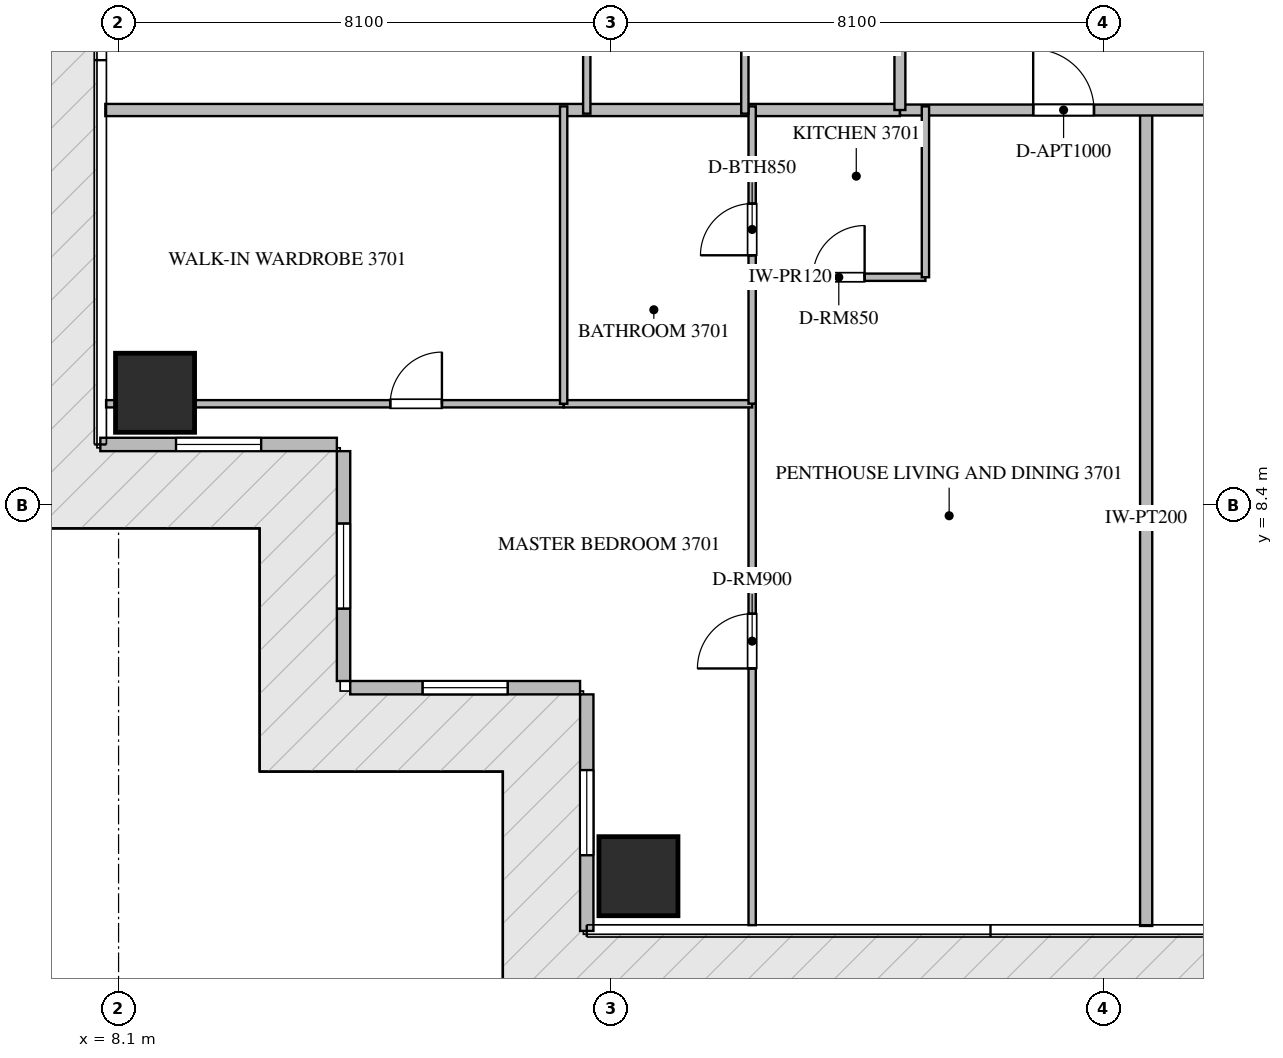
"""IFC4 building model, lengths in metres.
Left out: names, types, materials, properties, quantities, classifications, styles, units other than length and angle.
Written with IfcOpenShell. Run it as: python <this file> out.ifc"""

import sys

from ifc_helpers import new_model, si_unit, direction, frame, frame_2d, origin, origin_2d, place, context, subcontext, project, spatial, rectangle, extrude, source, transform, mapped, element, fill, save


model = new_model("IFC4")
c1 = context("Model", 3, precision=1e-05, world=origin(), true_north=direction((0.0, 1.0)))
c2 = subcontext(c1, "Body", "Model", "MODEL_VIEW")
j1 = project(units=[si_unit("LENGTHUNIT", "METRE"), si_unit("PLANEANGLEUNIT", "RADIAN")], contexts=[c1])
p1 = place(None, origin())
s1 = spatial("IfcSite", under=j1, at=p1, CompositionType="ELEMENT")
p2 = place(p1, origin())
s2 = spatial("IfcBuilding", under=s1, at=p2, CompositionType="ELEMENT")
p3 = place(p2, frame((0.0, 0.0, 150.15)))
s3 = spatial("IfcBuildingStorey", under=s2, at=p3, CompositionType="ELEMENT", Elevation=150.15)
m1 = source(origin(), c2, "Body", "SweptSolid", [
    extrude(rectangle(XDim=1.3, YDim=1.3, at=origin_2d()), origin(), (0.0, 0.0, 1.0), 3.75),
])
for number, where, z_axis, x_axis in (
    (1, (16.65, 2.3, -0.26), (0.0, 0.0, 1.0), (1.0, 0.0, 0.0)),
    (2, (8.7, 10.25, -0.26), (0.0, 0.0, 1.0), (1.0, 0.0, 0.0)),
):
    element("IfcColumn", number, at=place(p3, frame(where, z_axis=z_axis, x_axis=x_axis)), inside=s3, PredefinedType="COLUMN", context=c2, shape_type="MappedRepresentation", body=[
        mapped(m1, transform((0.0, 0.0, 0.0), scale=1.0)),
    ])
p4 = place(p3, frame((7.8, 9.4, 0.0), z_axis=(0.0, 0.0, 1.0), x_axis=(1.0, 0.0, 0.0)))
e3 = element("IfcWall", 3, at=p4, inside=s3, PredefinedType="ELEMENTEDWALL", context=c2, shape_type="SweptSolid", body=[
    extrude(rectangle(XDim=3.89, YDim=0.22, at=frame_2d((1.945, 0.0))), origin(), (0.0, 0.0, 1.0), 3.475),
])
p5 = place(p4, frame((1.245, 0.0, 0.65)))
e4 = element("IfcOpeningElement", 4, at=p5, cuts=e3, PredefinedType="OPENING", context=c2, shape_type="SweptSolid", body=[
    extrude(rectangle(XDim=1.4, YDim=2.05, at=frame_2d((0.7, 1.025))), frame((0.0, 0.12, 0.0), z_axis=(0.0, -1.0, 0.0), x_axis=(1.0, 0.0, 0.0)), (0.0, 0.0, 1.0), 0.24),
])
p6 = place(p3, frame((11.8, 9.29, 0.0), z_axis=(0.0, 0.0, 1.0), x_axis=(0.0, -1.0, 0.0)))
e5 = element("IfcWall", 5, at=p6, inside=s3, PredefinedType="ELEMENTEDWALL", context=c2, shape_type="SweptSolid", body=[
    extrude(rectangle(XDim=3.78, YDim=0.22, at=frame_2d((1.89, 0.0))), origin(), (0.0, 0.0, 1.0), 3.475),
])
p7 = place(p6, frame((1.19, 0.0, 0.65)))
e6 = element("IfcOpeningElement", 6, at=p7, cuts=e5, PredefinedType="OPENING", context=c2, shape_type="SweptSolid", body=[
    extrude(rectangle(XDim=1.4, YDim=2.05, at=frame_2d((0.7, 1.025))), frame((0.0, 0.12, 0.0), z_axis=(0.0, -1.0, 0.0), x_axis=(1.0, 0.0, 0.0)), (0.0, 0.0, 1.0), 0.24),
])
p8 = place(p3, frame((11.91, 5.4, 0.0), z_axis=(0.0, 0.0, 1.0), x_axis=(1.0, 0.0, 0.0)))
e7 = element("IfcWall", 7, at=p8, inside=s3, PredefinedType="ELEMENTEDWALL", context=c2, shape_type="SweptSolid", body=[
    extrude(rectangle(XDim=3.78, YDim=0.22, at=frame_2d((1.89, 0.0))), origin(), (0.0, 0.0, 1.0), 3.475),
])
p9 = place(p8, frame((1.19, 0.0, 0.65)))
e8 = element("IfcOpeningElement", 8, at=p9, cuts=e7, PredefinedType="OPENING", context=c2, shape_type="SweptSolid", body=[
    extrude(rectangle(XDim=1.4, YDim=2.05, at=frame_2d((0.7, 1.025))), frame((0.0, 0.12, 0.0), z_axis=(0.0, -1.0, 0.0), x_axis=(1.0, 0.0, 0.0)), (0.0, 0.0, 1.0), 0.24),
])
p10 = place(p3, frame((15.8, 5.29, 0.0), z_axis=(0.0, 0.0, 1.0), x_axis=(0.0, -1.0, 0.0)))
e9 = element("IfcWall", 9, at=p10, inside=s3, PredefinedType="ELEMENTEDWALL", context=c2, shape_type="SweptSolid", body=[
    extrude(rectangle(XDim=3.89, YDim=0.22, at=frame_2d((1.945, 0.0))), origin(), (0.0, 0.0, 1.0), 3.475),
])
p11 = place(p10, frame((1.245, 0.0, 0.65)))
e10 = element("IfcOpeningElement", 10, at=p11, cuts=e9, PredefinedType="OPENING", context=c2, shape_type="SweptSolid", body=[
    extrude(rectangle(XDim=1.4, YDim=2.05, at=frame_2d((0.7, 1.025))), frame((0.0, 0.12, 0.0), z_axis=(0.0, -1.0, 0.0), x_axis=(1.0, 0.0, 0.0)), (0.0, 0.0, 1.0), 0.24),
])
p12 = place(p3, frame((25.0, 1.482, 0.0), z_axis=(0.0, 0.0, 1.0), x_axis=(0.0, 1.0, 0.0)))
e11 = element("IfcWall", 11, at=p12, inside=s3, PredefinedType="PARTITIONING", context=c2, shape_type="SweptSolid", body=[
    extrude(rectangle(XDim=13.418, YDim=0.2, at=frame_2d((6.709, 0.0))), origin(), (0.0, 0.0, 1.0), 3.49),
])
p13 = place(p3, frame((7.882, 14.9, 0.0), z_axis=(0.0, 0.0, 1.0), x_axis=(1.0, 0.0, 0.0)))
e12 = element("IfcWall", 12, at=p13, inside=s3, PredefinedType="PARTITIONING", context=c2, shape_type="SweptSolid", body=[
    extrude(rectangle(XDim=13.068, YDim=0.2, at=frame_2d((6.534, 0.0))), origin(), (0.0, 0.0, 1.0), 3.49),
])
p14 = place(p3, frame((20.952, 14.9, 0.0), z_axis=(0.0, 0.0, 1.0), x_axis=(1.0, 0.0, 0.0)))
e13 = element("IfcWall", 13, at=p14, inside=s3, PredefinedType="PARTITIONING", context=c2, shape_type="SweptSolid", body=[
    extrude(rectangle(XDim=22.896, YDim=0.18, at=frame_2d((11.448, 0.0))), origin(), (0.0, 0.0, 1.0), 3.49),
])
p15 = place(p14, frame((2.19, 0.0, 0.0)))
e14 = element("IfcOpeningElement", 14, at=p15, cuts=e13, PredefinedType="OPENING", context=c2, shape_type="SweptSolid", body=[
    extrude(rectangle(XDim=1.0, YDim=2.15, at=frame_2d((0.5, 1.075))), frame((0.0, 0.1, 0.0), z_axis=(0.0, -1.0, 0.0), x_axis=(1.0, 0.0, 0.0)), (0.0, 0.0, 1.0), 0.2),
])
p16 = place(p14, frame((5.802, 0.0, 0.0)))
e15 = element("IfcOpeningElement", 15, at=p16, cuts=e13, PredefinedType="OPENING", context=c2, shape_type="SweptSolid", body=[
    extrude(rectangle(XDim=1.0, YDim=2.15, at=frame_2d((0.5, 1.075))), frame((0.0, 0.1, 0.0), z_axis=(0.0, -1.0, 0.0), x_axis=(1.0, 0.0, 0.0)), (0.0, 0.0, 1.0), 0.2),
])
p17 = place(p14, frame((12.196, 0.0, 0.0)))
e16 = element("IfcOpeningElement", 16, at=p17, cuts=e13, PredefinedType="OPENING", context=c2, shape_type="SweptSolid", body=[
    extrude(rectangle(XDim=1.0, YDim=2.15, at=frame_2d((0.5, 1.075))), frame((0.0, 0.1, 0.0), z_axis=(0.0, -1.0, 0.0), x_axis=(1.0, 0.0, 0.0)), (0.0, 0.0, 1.0), 0.2),
])
p18 = place(p14, frame((19.706, 0.0, 0.0)))
e17 = element("IfcOpeningElement", 17, at=p18, cuts=e13, PredefinedType="OPENING", context=c2, shape_type="SweptSolid", body=[
    extrude(rectangle(XDim=1.0, YDim=2.15, at=frame_2d((0.5, 1.075))), frame((0.0, 0.1, 0.0), z_axis=(0.0, -1.0, 0.0), x_axis=(1.0, 0.0, 0.0)), (0.0, 0.0, 1.0), 0.2),
])
p19 = place(p3, frame((20.95, 14.9, 0.0), z_axis=(0.0, 0.0, 1.0), x_axis=(0.0, 1.0, 0.0)))
e18 = element("IfcWall", 18, at=p19, inside=s3, PredefinedType="PARTITIONING", context=c2, shape_type="SweptSolid", body=[
    extrude(rectangle(XDim=18.7, YDim=0.18, at=frame_2d((9.35, 0.0))), origin(), (0.0, 0.0, 1.0), 3.49),
])
p20 = place(p19, frame((5.823, 0.0, 0.0)))
e19 = element("IfcOpeningElement", 19, at=p20, cuts=e18, PredefinedType="OPENING", context=c2, shape_type="SweptSolid", body=[
    extrude(rectangle(XDim=1.0, YDim=2.15, at=frame_2d((0.5, 1.075))), frame((0.0, 0.1, 0.0), z_axis=(0.0, -1.0, 0.0), x_axis=(1.0, 0.0, 0.0)), (0.0, 0.0, 1.0), 0.2),
])
p21 = place(p19, frame((15.134, 0.0, 0.0)))
e20 = element("IfcOpeningElement", 20, at=p21, cuts=e18, PredefinedType="OPENING", context=c2, shape_type="SweptSolid", body=[
    extrude(rectangle(XDim=1.0, YDim=2.15, at=frame_2d((0.5, 1.075))), frame((0.0, 0.1, 0.0), z_axis=(0.0, -1.0, 0.0), x_axis=(1.0, 0.0, 0.0)), (0.0, 0.0, 1.0), 0.2),
])
p22 = place(p3, frame((18.52, 12.15, 0.0), z_axis=(0.0, 0.0, 1.0), x_axis=(1.0, 0.0, 0.0)))
e21 = element("IfcWall", 21, at=p22, inside=s3, PredefinedType="PARTITIONING", context=c2, shape_type="SweptSolid", body=[
    extrude(rectangle(XDim=2.85, YDim=0.12, at=frame_2d((1.425, 0.0))), origin(), (0.0, 0.0, 1.0), 3.49),
])
p23 = place(p22, frame((1.0, 0.0, 0.0)))
e22 = element("IfcOpeningElement", 22, at=p23, cuts=e21, PredefinedType="OPENING", context=c2, shape_type="SweptSolid", body=[
    extrude(rectangle(XDim=0.85, YDim=2.1, at=frame_2d((0.425, 1.05))), frame((0.0, 0.07, 0.0), z_axis=(0.0, -1.0, 0.0), x_axis=(1.0, 0.0, 0.0)), (0.0, 0.0, 1.0), 0.14),
])
p24 = place(p3, frame((21.37, 12.15, 0.0), z_axis=(0.0, 0.0, 1.0), x_axis=(0.0, 1.0, 0.0)))
e23 = element("IfcWall", 23, at=p24, inside=s3, PredefinedType="PARTITIONING", context=c2, shape_type="SweptSolid", body=[
    extrude(rectangle(XDim=2.81, YDim=0.12, at=frame_2d((1.405, 0.0))), origin(), (0.0, 0.0, 1.0), 3.49),
])
p25 = place(p3, frame((18.52, 1.495, 0.0), z_axis=(0.0, 0.0, 1.0), x_axis=(0.0, 1.0, 0.0)))
e24 = element("IfcWall", 24, at=p25, inside=s3, PredefinedType="PARTITIONING", context=c2, shape_type="SweptSolid", body=[
    extrude(rectangle(XDim=8.574, YDim=0.12, at=frame_2d((4.287, 0.0))), origin(), (0.0, 0.0, 1.0), 3.49),
])
p26 = place(p25, frame((4.221, 0.0, 0.0)))
e25 = element("IfcOpeningElement", 25, at=p26, cuts=e24, PredefinedType="OPENING", context=c2, shape_type="SweptSolid", body=[
    extrude(rectangle(XDim=0.9, YDim=2.1, at=frame_2d((0.45, 1.05))), frame((0.0, 0.07, 0.0), z_axis=(0.0, -1.0, 0.0), x_axis=(1.0, 0.0, 0.0)), (0.0, 0.0, 1.0), 0.14),
])
p27 = place(p3, frame((7.895, 10.069, 0.0), z_axis=(0.0, 0.0, 1.0), x_axis=(1.0, 0.0, 0.0)))
e26 = element("IfcWall", 26, at=p27, inside=s3, PredefinedType="PARTITIONING", context=c2, shape_type="SweptSolid", body=[
    extrude(rectangle(XDim=7.525, YDim=0.12, at=frame_2d((3.762, 0.0))), origin(), (0.0, 0.0, 1.0), 2.972),
])
p28 = place(p27, frame((4.673, 0.0, 0.0)))
e27 = element("IfcOpeningElement", 27, at=p28, cuts=e26, PredefinedType="OPENING", context=c2, shape_type="SweptSolid", body=[
    extrude(rectangle(XDim=0.85, YDim=2.1, at=frame_2d((0.425, 1.05))), frame((0.0, 0.07, 0.0), z_axis=(0.0, -1.0, 0.0), x_axis=(1.0, 0.0, 0.0)), (0.0, 0.0, 1.0), 0.14),
])
p29 = place(p3, frame((15.422, 10.069, 0.0), z_axis=(0.0, 0.0, 1.0), x_axis=(1.0, 0.0, 0.0)))
e28 = element("IfcWall", 28, at=p29, inside=s3, PredefinedType="PARTITIONING", context=c2, shape_type="SweptSolid", body=[
    extrude(rectangle(XDim=3.098, YDim=0.12, at=frame_2d((1.549, 0.0))), origin(), (0.0, 0.0, 1.0), 2.972),
])
p30 = place(p3, frame((15.42, 10.069, 0.0), z_axis=(0.0, 0.0, 1.0), x_axis=(0.0, 1.0, 0.0)))
e29 = element("IfcWall", 29, at=p30, inside=s3, PredefinedType="PARTITIONING", context=c2, shape_type="SweptSolid", body=[
    extrude(rectangle(XDim=4.891, YDim=0.12, at=frame_2d((2.445, 0.0))), origin(), (0.0, 0.0, 1.0), 3.49),
])
p31 = place(p3, frame((18.52, 10.071, 0.0), z_axis=(0.0, 0.0, 1.0), x_axis=(0.0, 1.0, 0.0)))
e30 = element("IfcWall", 30, at=p31, inside=s3, PredefinedType="PARTITIONING", context=c2, shape_type="SweptSolid", body=[
    extrude(rectangle(XDim=4.889, YDim=0.12, at=frame_2d((2.444, 0.0))), origin(), (0.0, 0.0, 1.0), 3.49),
])
p32 = place(p31, frame((2.44, 0.0, 0.0)))
e31 = element("IfcOpeningElement", 31, at=p32, cuts=e30, PredefinedType="OPENING", context=c2, shape_type="SweptSolid", body=[
    extrude(rectangle(XDim=0.85, YDim=2.1, at=frame_2d((0.425, 1.05))), frame((0.0, 0.07, 0.0), z_axis=(0.0, -1.0, 0.0), x_axis=(1.0, 0.0, 0.0)), (0.0, 0.0, 1.0), 0.14),
])
for number, where, z_axis, x_axis in (
    (32, (18.4, 14.84, 0.0), (0.0, 0.0, 1.0), (0.0, 1.0, 0.0)),
    (33, (15.8, 14.84, 0.0), (0.0, 0.0, 1.0), (0.0, 1.0, 0.0)),
):
    element("IfcWall", number, at=place(p3, frame(where, z_axis=z_axis, x_axis=x_axis)), inside=s3, PredefinedType="PARTITIONING", context=c2, shape_type="SweptSolid", body=[
        extrude(rectangle(XDim=2.81, YDim=0.12, at=frame_2d((1.405, 0.0))), origin(), (0.0, 0.0, 1.0), 3.49),
    ])
m2 = source(origin(), c2, "Body", "SweptSolid", [
    extrude(rectangle(XDim=1.4, YDim=2.05, at=frame_2d((0.7, 1.025))), frame((0.0, 0.03, 0.0), z_axis=(0.0, -1.0, 0.0), x_axis=(1.0, 0.0, 0.0)), (0.0, 0.0, 1.0), 0.06),
])
p33 = place(p5, origin())
e34 = element("IfcWindow", 34, at=p33, inside=s3, PartitioningType="SINGLE_PANEL", PredefinedType="WINDOW", context=c2, shape_type="MappedRepresentation", body=[
    mapped(m2, transform((0.0, 0.0, 0.0), scale=1.0)),
])
fill(e4, e34)
p34 = place(p7, origin())
e35 = element("IfcWindow", 35, at=p34, inside=s3, PartitioningType="SINGLE_PANEL", PredefinedType="WINDOW", context=c2, shape_type="MappedRepresentation", body=[
    mapped(m2, transform((0.0, 0.0, 0.0), scale=1.0)),
])
fill(e6, e35)
p35 = place(p9, origin())
e36 = element("IfcWindow", 36, at=p35, inside=s3, PartitioningType="SINGLE_PANEL", PredefinedType="WINDOW", context=c2, shape_type="MappedRepresentation", body=[
    mapped(m2, transform((0.0, 0.0, 0.0), scale=1.0)),
])
fill(e8, e36)
p36 = place(p11, origin())
e37 = element("IfcWindow", 37, at=p36, inside=s3, PartitioningType="SINGLE_PANEL", PredefinedType="WINDOW", context=c2, shape_type="MappedRepresentation", body=[
    mapped(m2, transform((0.0, 0.0, 0.0), scale=1.0)),
])
fill(e10, e37)
m3 = source(origin(), c2, "Body", "SweptSolid", [
    extrude(rectangle(XDim=1.0, YDim=2.15, at=frame_2d((0.5, 1.075))), frame((0.0, 0.025, 0.0), z_axis=(0.0, -1.0, 0.0), x_axis=(1.0, 0.0, 0.0)), (0.0, 0.0, 1.0), 0.05),
])
p37 = place(p15, origin())
e38 = element("IfcDoor", 38, at=p37, inside=s3, OperationType="SINGLE_SWING_LEFT", PredefinedType="DOOR", context=c2, shape_type="MappedRepresentation", body=[
    mapped(m3, transform((0.0, 0.0, 0.0), scale=1.0)),
])
fill(e14, e38)
m4 = source(origin(), c2, "Body", "SweptSolid", [
    extrude(rectangle(XDim=0.85, YDim=2.1, at=frame_2d((0.425, 1.05))), frame((0.0, 0.025, 0.0), z_axis=(0.0, -1.0, 0.0), x_axis=(1.0, 0.0, 0.0)), (0.0, 0.0, 1.0), 0.05),
])
p38 = place(p23, origin())
e39 = element("IfcDoor", 39, at=p38, inside=s3, OperationType="SINGLE_SWING_RIGHT", PredefinedType="DOOR", context=c2, shape_type="MappedRepresentation", body=[
    mapped(m4, transform((0.0, 0.0, 0.0), scale=1.0)),
])
fill(e22, e39)
m5 = source(origin(), c2, "Body", "SweptSolid", [
    extrude(rectangle(XDim=0.9, YDim=2.1, at=frame_2d((0.45, 1.05))), frame((0.0, 0.025, 0.0), z_axis=(0.0, -1.0, 0.0), x_axis=(1.0, 0.0, 0.0)), (0.0, 0.0, 1.0), 0.05),
])
p39 = place(p26, origin())
e40 = element("IfcDoor", 40, at=p39, inside=s3, OperationType="SINGLE_SWING_LEFT", PredefinedType="DOOR", context=c2, shape_type="MappedRepresentation", body=[
    mapped(m5, transform((0.0, 0.0, 0.0), scale=1.0)),
])
fill(e25, e40)
p40 = place(p28, origin())
e41 = element("IfcDoor", 41, at=p40, inside=s3, OperationType="SINGLE_SWING_RIGHT", PredefinedType="DOOR", context=c2, shape_type="MappedRepresentation", body=[
    mapped(m4, transform((0.0, 0.0, 0.0), scale=1.0)),
])
fill(e27, e41)
p41 = place(p32, origin())
e42 = element("IfcDoor", 42, at=p41, inside=s3, OperationType="SINGLE_SWING_LEFT", PredefinedType="DOOR", context=c2, shape_type="MappedRepresentation", body=[
    mapped(m4, transform((0.0, 0.0, 0.0), scale=1.0)),
])
fill(e31, e42)
save(model, sys.argv[1])
